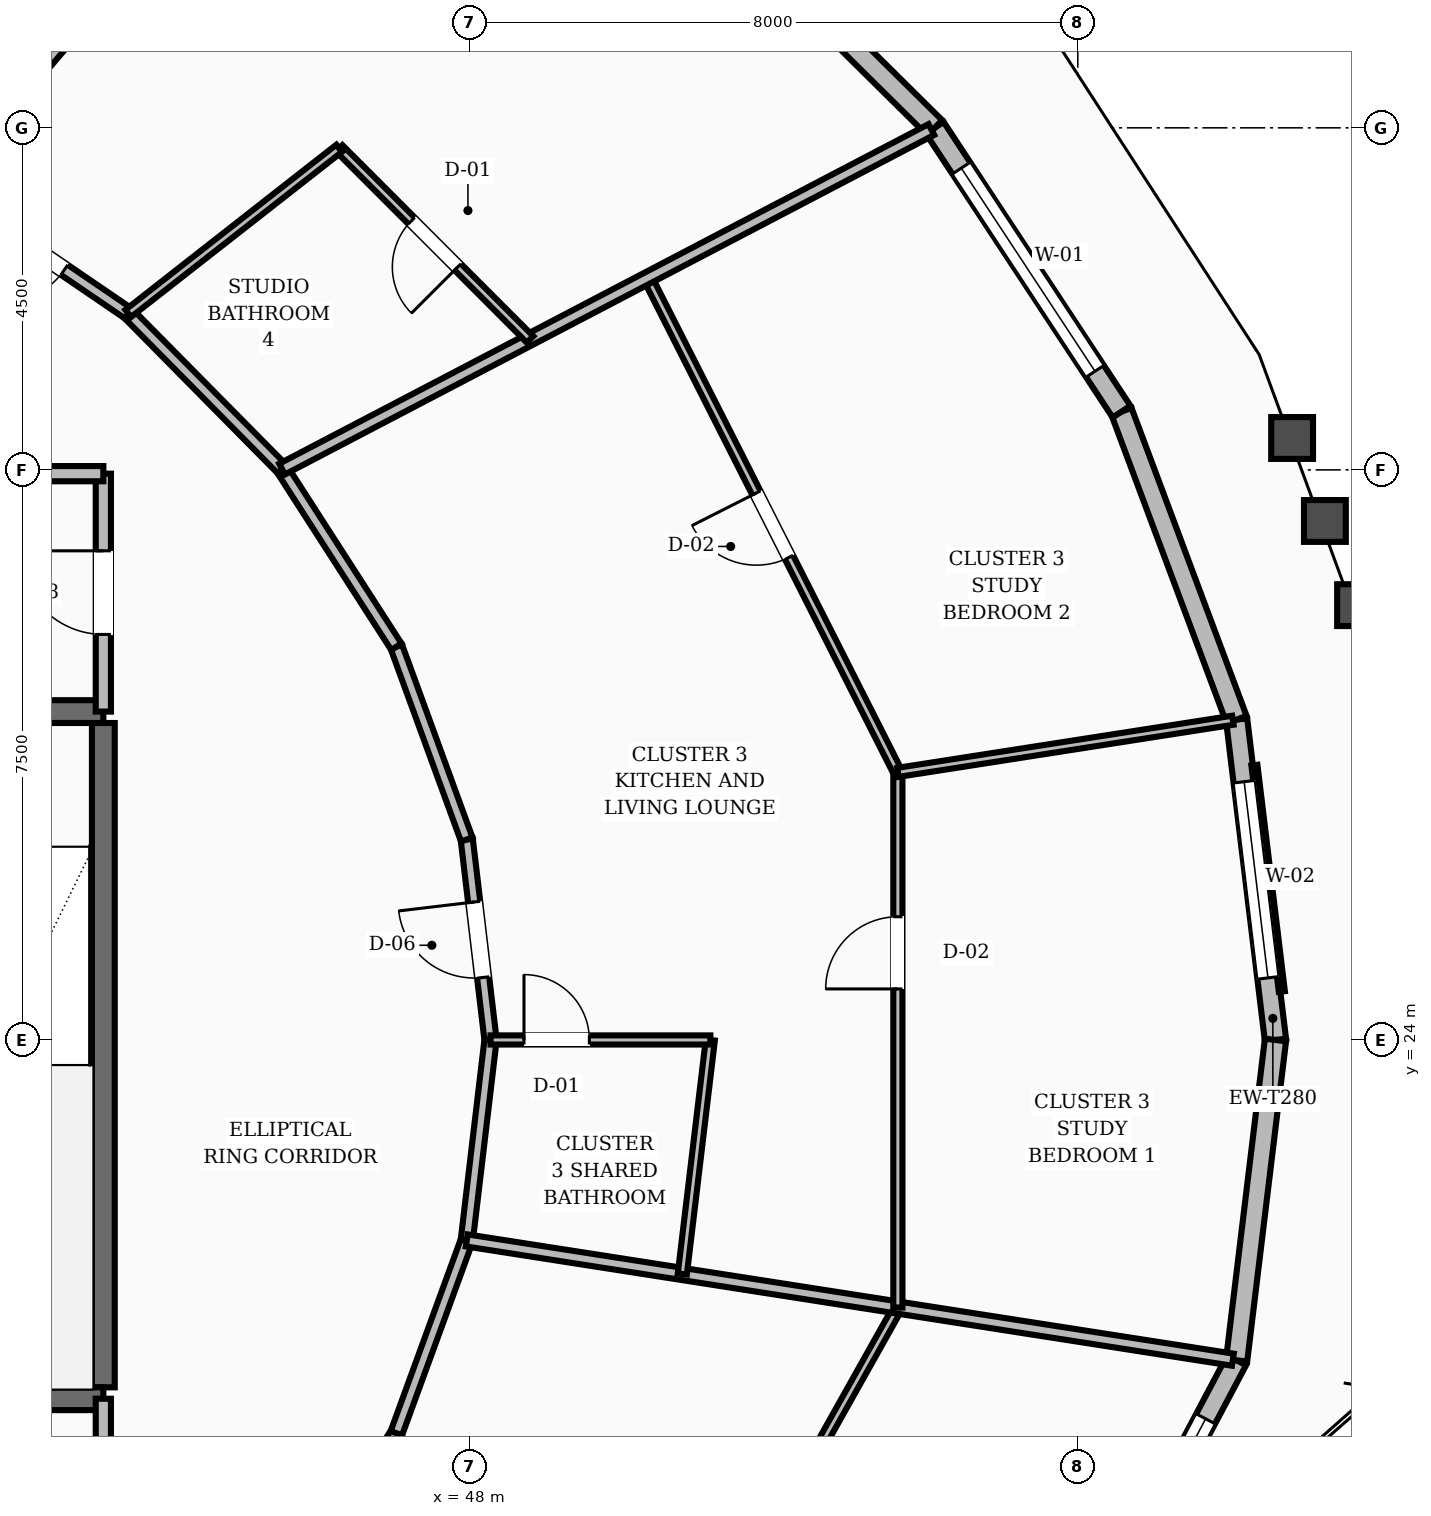
"""IFC4 building model, lengths in metres.
Left out: names, types, materials, properties, quantities, classifications, styles, units other than length and angle.
Written with IfcOpenShell. Run it as: python <this file> out.ifc"""

import sys

from ifc_helpers import new_model, si_unit, direction, frame, frame_2d, origin, place, context, subcontext, project, spatial, rectangle, extrude, element, fill, save


model = new_model("IFC4")
c1 = context("Model", 3, precision=1e-05, world=origin(), true_north=direction((0.0, 1.0)))
c2 = subcontext(c1, "Body", "Model", "MODEL_VIEW")
j1 = project(units=[si_unit("LENGTHUNIT", "METRE"), si_unit("PLANEANGLEUNIT", "RADIAN")], contexts=[c1])
p1 = place(None, origin())
s1 = spatial("IfcSite", under=j1, at=p1, CompositionType="ELEMENT")
p2 = place(p1, origin())
s2 = spatial("IfcBuilding", under=s1, at=p2, CompositionType="ELEMENT")
p3 = place(p2, frame((0.0, 0.0, 55.6)))
s3 = spatial("IfcBuildingStorey", under=s2, at=p3, CompositionType="ELEMENT", Elevation=55.6)
p4 = place(p3, frame((43.18, 19.43, 0.0), z_axis=(0.0, 0.0, 1.0), x_axis=(0.0, 1.0, 0.0)))
e1 = element("IfcWall", 1, at=p4, inside=s3, PredefinedType="SHEAR", context=c2, shape_type="SweptSolid", body=[
    extrude(rectangle(XDim=8.74, YDim=0.3, at=frame_2d((4.37, 0.0))), origin(), (0.0, 0.0, 1.0), 3.6),
])
p5 = place(p3, frame((39.58, 19.28, 0.0), z_axis=(0.0, 0.0, 1.0), x_axis=(1.0, 0.0, 0.0)))
e2 = element("IfcWall", 2, at=p5, inside=s3, PredefinedType="SHEAR", context=c2, shape_type="SweptSolid", body=[
    extrude(rectangle(XDim=3.6, YDim=0.3, at=frame_2d((1.8, 0.0))), origin(), (0.0, 0.0, 1.0), 3.6),
])
p6 = place(p3, frame((39.58, 28.32, 0.0), z_axis=(0.0, 0.0, 1.0), x_axis=(1.0, 0.0, 0.0)))
e3 = element("IfcWall", 3, at=p6, inside=s3, PredefinedType="SHEAR", context=c2, shape_type="SweptSolid", body=[
    extrude(rectangle(XDim=3.6, YDim=0.3, at=frame_2d((1.8, 0.0))), origin(), (0.0, 0.0, 1.0), 3.6),
])
p7 = place(p6, frame((1.3, 0.0, 0.0)))
e4 = element("IfcOpeningElement", 4, at=p7, cuts=e3, PredefinedType="OPENING", context=c2, shape_type="SweptSolid", body=[
    extrude(rectangle(XDim=1.1, YDim=2.1, at=frame_2d((0.55, 1.05))), frame((0.0, 0.16, 0.0), z_axis=(0.0, -1.0, 0.0), x_axis=(1.0, 0.0, 0.0)), (0.0, 0.0, 1.0), 0.32),
])
p8 = place(p3, frame((58.601, 24.0, 0.0), z_axis=(0.0, 0.0, 1.0), x_axis=(-0.120374306833, 0.992728576326, 0.0)))
e5 = element("IfcWall", 5, at=p8, inside=s3, PredefinedType="STANDARD", context=c2, shape_type="SweptSolid", body=[
    extrude(rectangle(XDim=4.245, YDim=0.28, at=frame_2d((2.123, 0.0))), origin(), (0.0, 0.0, 1.0), 2.65),
])
p9 = place(p8, frame((0.823, 0.0, 0.8)))
e6 = element("IfcOpeningElement", 6, at=p9, cuts=e5, PredefinedType="OPENING", context=c2, shape_type="SweptSolid", body=[
    extrude(rectangle(XDim=2.6, YDim=1.65, at=frame_2d((1.3, 0.825))), frame((0.0, 0.15, 0.0), z_axis=(0.0, -1.0, 0.0), x_axis=(1.0, 0.0, 0.0)), (0.0, 0.0, 1.0), 0.3),
])
p10 = place(p3, frame((58.09, 28.214, 0.0), z_axis=(0.0, 0.0, 1.0), x_axis=(-0.349991270329, 0.936752961401, 0.0)))
e7 = element("IfcWall", 7, at=p10, inside=s3, PredefinedType="STANDARD", context=c2, shape_type="SweptSolid", body=[
    extrude(rectangle(XDim=4.326, YDim=0.28, at=frame_2d((2.163, 0.0))), origin(), (0.0, 0.0, 1.0), 2.65),
])
p11 = place(p3, frame((56.576, 32.266, 0.0), z_axis=(0.0, 0.0, 1.0), x_axis=(-0.549775955505, 0.835312156471, 0.0)))
e8 = element("IfcWall", 8, at=p11, inside=s3, PredefinedType="STANDARD", context=c2, shape_type="SweptSolid", body=[
    extrude(rectangle(XDim=4.471, YDim=0.28, at=frame_2d((2.235, 0.0))), origin(), (0.0, 0.0, 1.0), 2.65),
])
p12 = place(p11, frame((0.635, 0.0, 0.8)))
e9 = element("IfcOpeningElement", 9, at=p12, cuts=e8, PredefinedType="OPENING", context=c2, shape_type="SweptSolid", body=[
    extrude(rectangle(XDim=3.2, YDim=1.65, at=frame_2d((1.6, 0.825))), frame((0.0, 0.15, 0.0), z_axis=(0.0, -1.0, 0.0), x_axis=(1.0, 0.0, 0.0)), (0.0, 0.0, 1.0), 0.3),
])
p13 = place(p3, frame((54.118, 36.001, 0.0), z_axis=(0.0, 0.0, 1.0), x_axis=(-0.710847800391, 0.703345864195, 0.0)))
e10 = element("IfcWall", 10, at=p13, inside=s3, PredefinedType="STANDARD", context=c2, shape_type="SweptSolid", body=[
    extrude(rectangle(XDim=4.654, YDim=0.28, at=frame_2d((2.327, 0.0))), origin(), (0.0, 0.0, 1.0), 2.65),
])
p14 = place(p3, frame((56.015, 15.867, 0.0), z_axis=(0.0, 0.0, 1.0), x_axis=(0.467773880132, 0.883848175348, 0.0)))
e11 = element("IfcWall", 11, at=p14, inside=s3, PredefinedType="STANDARD", context=c2, shape_type="SweptSolid", body=[
    extrude(rectangle(XDim=4.434, YDim=0.28, at=frame_2d((2.217, 0.0))), origin(), (0.0, 0.0, 1.0), 2.65),
])
p15 = place(p14, frame((0.963, 0.0, 0.8)))
e12 = element("IfcOpeningElement", 12, at=p15, cuts=e11, PredefinedType="OPENING", context=c2, shape_type="SweptSolid", body=[
    extrude(rectangle(XDim=2.6, YDim=1.65, at=frame_2d((1.3, 0.825))), frame((0.0, 0.15, 0.0), z_axis=(0.0, -1.0, 0.0), x_axis=(1.0, 0.0, 0.0)), (0.0, 0.0, 1.0), 0.3),
])
p16 = place(p3, frame((58.09, 19.786, 0.0), z_axis=(0.0, 0.0, 1.0), x_axis=(0.120374306833, 0.992728576326, 0.0)))
e13 = element("IfcWall", 13, at=p16, inside=s3, PredefinedType="STANDARD", context=c2, shape_type="SweptSolid", body=[
    extrude(rectangle(XDim=4.245, YDim=0.28, at=frame_2d((2.123, 0.0))), origin(), (0.0, 0.0, 1.0), 2.65),
])
p17 = place(p3, frame((43.18, 28.32, 0.0), z_axis=(0.0, 0.0, 1.0), x_axis=(0.0, 1.0, 0.0)))
e14 = element("IfcWall", 14, at=p17, inside=s3, PredefinedType="SOLIDWALL", context=c2, shape_type="SweptSolid", body=[
    extrude(rectangle(XDim=3.13, YDim=0.2, at=frame_2d((1.565, 0.0))), origin(), (0.0, 0.0, 1.0), 2.61),
])
p18 = place(p17, frame((1.015, 0.0, 0.0)))
e15 = element("IfcOpeningElement", 15, at=p18, cuts=e14, PredefinedType="OPENING", context=c2, shape_type="SweptSolid", body=[
    extrude(rectangle(XDim=1.1, YDim=2.1, at=frame_2d((0.55, 1.05))), frame((0.0, 0.11, 0.0), z_axis=(0.0, -1.0, 0.0), x_axis=(1.0, 0.0, 0.0)), (0.0, 0.0, 1.0), 0.22),
])
p19 = place(p3, frame((39.2, 31.45, 0.0), z_axis=(0.0, 0.0, 1.0), x_axis=(1.0, 0.0, 0.0)))
e16 = element("IfcWall", 16, at=p19, inside=s3, PredefinedType="SOLIDWALL", context=c2, shape_type="SweptSolid", body=[
    extrude(rectangle(XDim=3.98, YDim=0.2, at=frame_2d((1.99, 0.0))), origin(), (0.0, 0.0, 1.0), 2.61),
])
p20 = place(p3, frame((43.18, 16.55, 0.0), z_axis=(0.0, 0.0, 1.0), x_axis=(0.0, 1.0, 0.0)))
e17 = element("IfcWall", 17, at=p20, inside=s3, PredefinedType="SOLIDWALL", context=c2, shape_type="SweptSolid", body=[
    extrude(rectangle(XDim=2.73, YDim=0.2, at=frame_2d((1.365, 0.0))), origin(), (0.0, 0.0, 1.0), 2.61),
])
p21 = place(p20, frame((0.89, 0.0, 0.0)))
e18 = element("IfcOpeningElement", 18, at=p21, cuts=e17, PredefinedType="OPENING", context=c2, shape_type="SweptSolid", body=[
    extrude(rectangle(XDim=0.95, YDim=2.1, at=frame_2d((0.475, 1.05))), frame((0.0, 0.11, 0.0), z_axis=(0.0, -1.0, 0.0), x_axis=(1.0, 0.0, 0.0)), (0.0, 0.0, 1.0), 0.22),
])
p22 = place(p3, frame((48.274, 24.0, 0.0), z_axis=(0.0, 0.0, 1.0), x_axis=(-0.117763961213, 0.99304161516, 0.0)))
e19 = element("IfcWall", 19, at=p22, inside=s3, PredefinedType="SOLIDWALL", context=c2, shape_type="SweptSolid", body=[
    extrude(rectangle(XDim=2.656, YDim=0.16, at=frame_2d((1.328, 0.0))), origin(), (0.0, 0.0, 1.0), 2.61),
])
p23 = place(p22, frame((0.828, 0.0, 0.0)))
e20 = element("IfcOpeningElement", 20, at=p23, cuts=e19, PredefinedType="OPENING", context=c2, shape_type="SweptSolid", body=[
    extrude(rectangle(XDim=1.0, YDim=2.1, at=frame_2d((0.5, 1.05))), frame((0.0, 0.09, 0.0), z_axis=(0.0, -1.0, 0.0), x_axis=(1.0, 0.0, 0.0)), (0.0, 0.0, 1.0), 0.18),
])
p24 = place(p3, frame((47.961, 26.637, 0.0), z_axis=(0.0, 0.0, 1.0), x_axis=(-0.343013437329, 0.939330496583, 0.0)))
e21 = element("IfcWall", 21, at=p24, inside=s3, PredefinedType="SOLIDWALL", context=c2, shape_type="SweptSolid", body=[
    extrude(rectangle(XDim=2.7, YDim=0.16, at=frame_2d((1.35, 0.0))), origin(), (0.0, 0.0, 1.0), 2.61),
])
p25 = place(p3, frame((47.035, 29.173, 0.0), z_axis=(0.0, 0.0, 1.0), x_axis=(-0.541126045017, 0.840941498206, 0.0)))
e22 = element("IfcWall", 22, at=p25, inside=s3, PredefinedType="SOLIDWALL", context=c2, shape_type="SweptSolid", body=[
    extrude(rectangle(XDim=2.779, YDim=0.16, at=frame_2d((1.39, 0.0))), origin(), (0.0, 0.0, 1.0), 2.61),
])
p26 = place(p3, frame((45.531, 31.51, 0.0), z_axis=(0.0, 0.0, 1.0), x_axis=(-0.702811997, 0.711375636969, 0.0)))
e23 = element("IfcWall", 23, at=p26, inside=s3, PredefinedType="SOLIDWALL", context=c2, shape_type="SweptSolid", body=[
    extrude(rectangle(XDim=2.879, YDim=0.16, at=frame_2d((1.44, 0.0))), origin(), (0.0, 0.0, 1.0), 2.61),
])
p27 = place(p3, frame((43.508, 33.559, 0.0), z_axis=(0.0, 0.0, 1.0), x_axis=(-0.826293096206, 0.56324037423, 0.0)))
e24 = element("IfcWall", 24, at=p27, inside=s3, PredefinedType="SOLIDWALL", context=c2, shape_type="SweptSolid", body=[
    extrude(rectangle(XDim=2.985, YDim=0.16, at=frame_2d((1.492, 0.0))), origin(), (0.0, 0.0, 1.0), 2.61),
])
p28 = place(p27, frame((1.017, 0.0, 0.0)))
e25 = element("IfcOpeningElement", 25, at=p28, cuts=e24, PredefinedType="OPENING", context=c2, shape_type="SweptSolid", body=[
    extrude(rectangle(XDim=0.95, YDim=2.1, at=frame_2d((0.475, 1.05))), frame((0.0, 0.09, 0.0), z_axis=(0.0, -1.0, 0.0), x_axis=(1.0, 0.0, 0.0)), (0.0, 0.0, 1.0), 0.18),
])
p29 = place(p3, frame((45.531, 16.49, 0.0), z_axis=(0.0, 0.0, 1.0), x_axis=(0.541126045017, 0.840941498206, 0.0)))
e26 = element("IfcWall", 26, at=p29, inside=s3, PredefinedType="SOLIDWALL", context=c2, shape_type="SweptSolid", body=[
    extrude(rectangle(XDim=2.779, YDim=0.16, at=frame_2d((1.39, 0.0))), origin(), (0.0, 0.0, 1.0), 2.61),
])
p30 = place(p3, frame((47.035, 18.827, 0.0), z_axis=(0.0, 0.0, 1.0), x_axis=(0.343013437329, 0.939330496583, 0.0)))
e27 = element("IfcWall", 27, at=p30, inside=s3, PredefinedType="SOLIDWALL", context=c2, shape_type="SweptSolid", body=[
    extrude(rectangle(XDim=2.7, YDim=0.16, at=frame_2d((1.35, 0.0))), origin(), (0.0, 0.0, 1.0), 2.61),
])
p31 = place(p3, frame((47.961, 21.363, 0.0), z_axis=(0.0, 0.0, 1.0), x_axis=(0.117763961213, 0.99304161516, 0.0)))
e28 = element("IfcWall", 28, at=p31, inside=s3, PredefinedType="SOLIDWALL", context=c2, shape_type="SweptSolid", body=[
    extrude(rectangle(XDim=2.656, YDim=0.16, at=frame_2d((1.328, 0.0))), origin(), (0.0, 0.0, 1.0), 2.61),
])
p32 = place(p3, frame((50.079, 14.149, 0.0), z_axis=(0.0, 0.0, 1.0), x_axis=(0.489569746755, 0.871964140927, 0.0)))
e29 = element("IfcWall", 29, at=p32, inside=s3, PredefinedType="PARTITIONING", context=c2, shape_type="SweptSolid", body=[
    extrude(rectangle(XDim=7.26, YDim=0.12, at=frame_2d((3.63, 0.0))), origin(), (0.0, 0.0, 1.0), 2.61),
])
p33 = place(p32, frame((3.155, 0.0, 0.0)))
e30 = element("IfcOpeningElement", 30, at=p33, cuts=e29, PredefinedType="OPENING", context=c2, shape_type="SweptSolid", body=[
    extrude(rectangle(XDim=0.95, YDim=2.1, at=frame_2d((0.475, 1.05))), frame((0.0, 0.07, 0.0), z_axis=(0.0, -1.0, 0.0), x_axis=(1.0, 0.0, 0.0)), (0.0, 0.0, 1.0), 0.14),
])
p34 = place(p3, frame((47.961, 21.363, 0.0), z_axis=(0.0, 0.0, 1.0), x_axis=(0.988098124705, -0.153824887305, 0.0)))
e31 = element("IfcWall", 31, at=p34, inside=s3, PredefinedType="SOLIDWALL", context=c2, shape_type="SweptSolid", body=[
    extrude(rectangle(XDim=10.2, YDim=0.16, at=frame_2d((5.1, 0.0))), origin(), (0.0, 0.0, 1.0), 2.61),
])
p35 = place(p3, frame((50.797, 20.921, 0.0), z_axis=(0.0, 0.0, 1.0), x_axis=(0.118819199309, 0.992915906749, 0.0)))
e32 = element("IfcWall", 32, at=p35, inside=s3, PredefinedType="PARTITIONING", context=c2, shape_type="SweptSolid", body=[
    extrude(rectangle(XDim=3.101, YDim=0.12, at=frame_2d((1.55, 0.0))), origin(), (0.0, 0.0, 1.0), 2.61),
])
p36 = place(p3, frame((48.274, 24.0, 0.0), z_axis=(0.0, 0.0, 1.0), x_axis=(1.0, 0.0, 0.0)))
e33 = element("IfcWall", 33, at=p36, inside=s3, PredefinedType="PARTITIONING", context=c2, shape_type="SweptSolid", body=[
    extrude(rectangle(XDim=2.892, YDim=0.12, at=frame_2d((1.446, 0.0))), origin(), (0.0, 0.0, 1.0), 2.61),
])
p37 = place(p36, frame((0.44, 0.0, 0.0)))
e34 = element("IfcOpeningElement", 34, at=p37, cuts=e33, PredefinedType="OPENING", context=c2, shape_type="SweptSolid", body=[
    extrude(rectangle(XDim=0.86, YDim=2.1, at=frame_2d((0.43, 1.05))), frame((0.0, 0.07, 0.0), z_axis=(0.0, -1.0, 0.0), x_axis=(1.0, 0.0, 0.0)), (0.0, 0.0, 1.0), 0.14),
])
p38 = place(p3, frame((53.633, 20.48, 0.0), z_axis=(0.0, 0.0, 1.0), x_axis=(0.0, 1.0, 0.0)))
e35 = element("IfcWall", 35, at=p38, inside=s3, PredefinedType="PARTITIONING", context=c2, shape_type="SweptSolid", body=[
    extrude(rectangle(XDim=7.041, YDim=0.12, at=frame_2d((3.52, 0.0))), origin(), (0.0, 0.0, 1.0), 2.61),
])
p39 = place(p38, frame((4.192, 0.0, 0.0)))
e36 = element("IfcOpeningElement", 36, at=p39, cuts=e35, PredefinedType="OPENING", context=c2, shape_type="SweptSolid", body=[
    extrude(rectangle(XDim=0.95, YDim=2.1, at=frame_2d((0.475, 1.05))), frame((0.0, 0.07, 0.0), z_axis=(0.0, -1.0, 0.0), x_axis=(1.0, 0.0, 0.0)), (0.0, 0.0, 1.0), 0.14),
])
p40 = place(p3, frame((53.633, 27.52, 0.0), z_axis=(0.0, 0.0, 1.0), x_axis=(-0.451721769602, 0.892158866384, 0.0)))
e37 = element("IfcWall", 37, at=p40, inside=s3, PredefinedType="PARTITIONING", context=c2, shape_type="SweptSolid", body=[
    extrude(rectangle(XDim=7.291, YDim=0.12, at=frame_2d((3.646, 0.0))), origin(), (0.0, 0.0, 1.0), 2.61),
])
p41 = place(p40, frame((3.17, 0.0, 0.0)))
e38 = element("IfcOpeningElement", 38, at=p41, cuts=e37, PredefinedType="OPENING", context=c2, shape_type="SweptSolid", body=[
    extrude(rectangle(XDim=0.95, YDim=2.1, at=frame_2d((0.475, 1.05))), frame((0.0, 0.07, 0.0), z_axis=(0.0, -1.0, 0.0), x_axis=(1.0, 0.0, 0.0)), (0.0, 0.0, 1.0), 0.14),
])
p42 = place(p3, frame((53.633, 27.52, 0.0), z_axis=(0.0, 0.0, 1.0), x_axis=(0.988100575884, 0.153809141271, 0.0)))
e39 = element("IfcWall", 39, at=p42, inside=s3, PredefinedType="PARTITIONING", context=c2, shape_type="SweptSolid", body=[
    extrude(rectangle(XDim=4.46, YDim=0.12, at=frame_2d((2.23, 0.0))), origin(), (0.0, 0.0, 1.0), 2.61),
])
p43 = place(p3, frame((45.531, 31.51, 0.0), z_axis=(0.0, 0.0, 1.0), x_axis=(0.886139175606, 0.463419207043, 0.0)))
e40 = element("IfcWall", 40, at=p43, inside=s3, PredefinedType="SOLIDWALL", context=c2, shape_type="SweptSolid", body=[
    extrude(rectangle(XDim=9.64, YDim=0.16, at=frame_2d((4.82, 0.0))), origin(), (0.0, 0.0, 1.0), 2.61),
])
p44 = place(p3, frame((48.794, 33.217, 0.0), z_axis=(0.0, 0.0, 1.0), x_axis=(-0.706831936487, 0.707381519099, 0.0)))
e41 = element("IfcWall", 41, at=p44, inside=s3, PredefinedType="PARTITIONING", context=c2, shape_type="SweptSolid", body=[
    extrude(rectangle(XDim=3.554, YDim=0.12, at=frame_2d((1.777, 0.0))), origin(), (0.0, 0.0, 1.0), 2.61),
])
p45 = place(p44, frame((1.347, 0.0, 0.0)))
e42 = element("IfcOpeningElement", 42, at=p45, cuts=e41, PredefinedType="OPENING", context=c2, shape_type="SweptSolid", body=[
    extrude(rectangle(XDim=0.86, YDim=2.1, at=frame_2d((0.43, 1.05))), frame((0.0, 0.07, 0.0), z_axis=(0.0, -1.0, 0.0), x_axis=(1.0, 0.0, 0.0)), (0.0, 0.0, 1.0), 0.14),
])
p46 = place(p3, frame((43.508, 33.559, 0.0), z_axis=(0.0, 0.0, 1.0), x_axis=(0.787449438054, 0.616379252172, 0.0)))
e43 = element("IfcWall", 43, at=p46, inside=s3, PredefinedType="PARTITIONING", context=c2, shape_type="SweptSolid", body=[
    extrude(rectangle(XDim=3.524, YDim=0.12, at=frame_2d((1.762, 0.0))), origin(), (0.0, 0.0, 1.0), 2.61),
])
p47 = place(p3, frame((41.041, 35.24, 0.0), z_axis=(0.0, 0.0, 1.0), x_axis=(0.649272964512, 0.760555466454, 0.0)))
e44 = element("IfcWall", 44, at=p47, inside=s3, PredefinedType="SOLIDWALL", context=c2, shape_type="SweptSolid", body=[
    extrude(rectangle(XDim=8.786, YDim=0.16, at=frame_2d((4.393, 0.0))), origin(), (0.0, 0.0, 1.0), 2.61),
])
p48 = place(p9, origin())
e45 = element("IfcWindow", 45, at=p48, inside=s3, PartitioningType="SINGLE_PANEL", PredefinedType="WINDOW", context=c2, shape_type="SweptSolid", body=[
    extrude(rectangle(XDim=2.6, YDim=1.65, at=frame_2d((1.3, 0.825))), frame((0.0, 0.03, 0.0), z_axis=(0.0, -1.0, 0.0), x_axis=(1.0, 0.0, 0.0)), (0.0, 0.0, 1.0), 0.06),
])
fill(e6, e45)
p49 = place(p12, origin())
e46 = element("IfcWindow", 46, at=p49, inside=s3, PartitioningType="SINGLE_PANEL", PredefinedType="WINDOW", context=c2, shape_type="SweptSolid", body=[
    extrude(rectangle(XDim=3.2, YDim=1.65, at=frame_2d((1.6, 0.825))), frame((0.0, 0.03, 0.0), z_axis=(0.0, -1.0, 0.0), x_axis=(1.0, 0.0, 0.0)), (0.0, 0.0, 1.0), 0.06),
])
fill(e9, e46)
p50 = place(p15, origin())
e47 = element("IfcWindow", 47, at=p50, inside=s3, PartitioningType="SINGLE_PANEL", PredefinedType="WINDOW", context=c2, shape_type="SweptSolid", body=[
    extrude(rectangle(XDim=2.6, YDim=1.65, at=frame_2d((1.3, 0.825))), frame((0.0, 0.03, 0.0), z_axis=(0.0, -1.0, 0.0), x_axis=(1.0, 0.0, 0.0)), (0.0, 0.0, 1.0), 0.06),
])
fill(e12, e47)
p51 = place(p18, origin())
e48 = element("IfcDoor", 48, at=p51, inside=s3, OperationType="SINGLE_SWING_RIGHT", PredefinedType="DOOR", context=c2, shape_type="SweptSolid", body=[
    extrude(rectangle(XDim=1.1, YDim=2.1, at=frame_2d((0.55, 1.05))), frame((0.0, 0.025, 0.0), z_axis=(0.0, -1.0, 0.0), x_axis=(1.0, 0.0, 0.0)), (0.0, 0.0, 1.0), 0.05),
])
fill(e15, e48)
p52 = place(p37, origin())
e49 = element("IfcDoor", 49, at=p52, inside=s3, OperationType="SINGLE_SWING_LEFT", PredefinedType="DOOR", context=c2, shape_type="SweptSolid", body=[
    extrude(rectangle(XDim=0.86, YDim=2.1, at=frame_2d((0.43, 1.05))), frame((0.0, 0.025, 0.0), z_axis=(0.0, -1.0, 0.0), x_axis=(1.0, 0.0, 0.0)), (0.0, 0.0, 1.0), 0.05),
])
fill(e34, e49)
p53 = place(p23, origin())
e50 = element("IfcDoor", 50, at=p53, inside=s3, OperationType="SINGLE_SWING_RIGHT", PredefinedType="DOOR", context=c2, shape_type="SweptSolid", body=[
    extrude(rectangle(XDim=1.0, YDim=2.1, at=frame_2d((0.5, 1.05))), frame((0.0, 0.025, 0.0), z_axis=(0.0, -1.0, 0.0), x_axis=(1.0, 0.0, 0.0)), (0.0, 0.0, 1.0), 0.05),
])
fill(e20, e50)
p54 = place(p39, origin())
e51 = element("IfcDoor", 51, at=p54, inside=s3, OperationType="SINGLE_SWING_LEFT", PredefinedType="DOOR", context=c2, shape_type="SweptSolid", body=[
    extrude(rectangle(XDim=0.95, YDim=2.1, at=frame_2d((0.475, 1.05))), frame((0.0, 0.025, 0.0), z_axis=(0.0, -1.0, 0.0), x_axis=(1.0, 0.0, 0.0)), (0.0, 0.0, 1.0), 0.05),
])
fill(e36, e51)
p55 = place(p41, origin())
e52 = element("IfcDoor", 52, at=p55, inside=s3, OperationType="SINGLE_SWING_RIGHT", PredefinedType="DOOR", context=c2, shape_type="SweptSolid", body=[
    extrude(rectangle(XDim=0.95, YDim=2.1, at=frame_2d((0.475, 1.05))), frame((0.0, 0.025, 0.0), z_axis=(0.0, -1.0, 0.0), x_axis=(1.0, 0.0, 0.0)), (0.0, 0.0, 1.0), 0.05),
])
fill(e38, e52)
p56 = place(p45, origin())
e53 = element("IfcDoor", 53, at=p56, inside=s3, OperationType="SINGLE_SWING_LEFT", PredefinedType="DOOR", context=c2, shape_type="SweptSolid", body=[
    extrude(rectangle(XDim=0.86, YDim=2.1, at=frame_2d((0.43, 1.05))), frame((0.0, 0.025, 0.0), z_axis=(0.0, -1.0, 0.0), x_axis=(1.0, 0.0, 0.0)), (0.0, 0.0, 1.0), 0.05),
])
fill(e42, e53)
p57 = place(p28, origin())
e54 = element("IfcDoor", 54, at=p57, inside=s3, OperationType="SINGLE_SWING_RIGHT", PredefinedType="DOOR", context=c2, shape_type="SweptSolid", body=[
    extrude(rectangle(XDim=0.95, YDim=2.1, at=frame_2d((0.475, 1.05))), frame((0.0, 0.025, 0.0), z_axis=(0.0, -1.0, 0.0), x_axis=(1.0, 0.0, 0.0)), (0.0, 0.0, 1.0), 0.05),
])
fill(e25, e54)
save(model, sys.argv[1])
